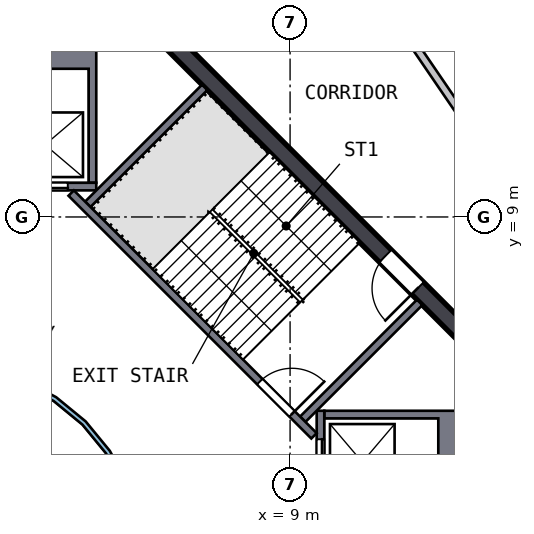
"""IFC4 building model, lengths in metres.
Left out: names, types, materials, properties, quantities, classifications, styles, units other than length and angle.
Written with IfcOpenShell. Run it as: python <this file> out.ifc"""

import sys

from ifc_helpers import new_model, si_unit, direction, frame, frame_2d, origin, place, context, subcontext, project, spatial, polyline, rectangle, outline, extrude, element, fill, save


model = new_model("IFC4")
c1 = context("Model", 3, precision=1e-05, world=origin(), true_north=direction((0.0, 1.0)))
c2 = subcontext(c1, "Body", "Model", "MODEL_VIEW")
j1 = project(units=[si_unit("LENGTHUNIT", "METRE"), si_unit("PLANEANGLEUNIT", "RADIAN")], contexts=[c1])
p1 = place(None, origin())
s1 = spatial("IfcSite", under=j1, at=p1, CompositionType="ELEMENT")
p2 = place(p1, origin())
s2 = spatial("IfcBuilding", under=s1, at=p2, CompositionType="ELEMENT")
p3 = place(p2, frame((0.0, 0.0, 295.0)))
s3 = spatial("IfcBuildingStorey", under=s2, at=p3, CompositionType="ELEMENT", Elevation=295.0)
p4 = place(p3, frame((13.841, 5.64, 0.0), z_axis=(0.0, 0.0, 1.0), x_axis=(-0.707106781, 0.707106781, 0.0)))
e1 = element("IfcWall", 1, at=p4, inside=s3, PredefinedType="SHEAR", context=c2, shape_type="SweptSolid", body=[
    extrude(rectangle(XDim=11.598, YDim=0.45, at=frame_2d((5.799, 0.0))), origin(), (0.0, 0.0, 1.0), 4.5),
])
p5 = place(p4, frame((2.099, 0.0, 0.0)))
e2 = element("IfcOpeningElement", 2, at=p5, cuts=e1, PredefinedType="OPENING", context=c2, shape_type="SweptSolid", body=[
    extrude(rectangle(XDim=1.2, YDim=2.1, at=frame_2d((0.6, 1.05))), frame((0.0, 0.235, 0.0), z_axis=(0.0, -1.0, 0.0), x_axis=(1.0, 0.0, 0.0)), (0.0, 0.0, 1.0), 0.47),
])
p6 = place(p3, origin())
e3 = element("IfcWall", 3, at=p6, inside=s3, PredefinedType="SOLIDWALL", context=c2, shape_type="SweptSolid", body=[
    extrude(outline(polyline([(13.55, 3.9), (13.55, 1.2), (9.9, 1.2), (9.9, 1.4), (12.9, 1.4), (12.9, 3.7), (9.9, 3.7), (9.9, 3.9), (13.55, 3.9)])), origin(), (0.0, 0.0, 1.0), 4.19),
])
p7 = place(p3, frame((9.8, 1.2, 0.0), z_axis=(0.0, 0.0, 1.0), x_axis=(0.0, 1.0, 0.0)))
e4 = element("IfcWall", 4, at=p7, inside=s3, PredefinedType="SOLIDWALL", context=c2, shape_type="SweptSolid", body=[
    extrude(rectangle(XDim=2.7, YDim=0.2, at=frame_2d((1.35, 0.0))), origin(), (0.0, 0.0, 1.0), 4.19),
])
p8 = place(p7, frame((0.75, 0.0, 0.0)))
e5 = element("IfcOpeningElement", 5, at=p8, cuts=e4, PredefinedType="OPENING", context=c2, shape_type="SweptSolid", body=[
    extrude(rectangle(XDim=1.2, YDim=2.1, at=frame_2d((0.6, 1.05))), frame((0.0, 0.11, 0.0), z_axis=(0.0, -1.0, 0.0), x_axis=(1.0, 0.0, 0.0)), (0.0, 0.0, 1.0), 0.22),
])
p9 = place(p3, origin())
e6 = element("IfcWall", 6, at=p9, inside=s3, PredefinedType="SOLIDWALL", context=c2, shape_type="SweptSolid", body=[
    extrude(outline(polyline([(3.9, 9.9), (3.7, 9.9), (3.7, 12.9), (1.4, 12.9), (1.4, 9.9), (1.2, 9.9), (1.2, 13.55), (3.9, 13.55), (3.9, 9.9)])), origin(), (0.0, 0.0, 1.0), 4.19),
])
p10 = place(p3, frame((1.2, 9.8, 0.0), z_axis=(0.0, 0.0, 1.0), x_axis=(1.0, 0.0, 0.0)))
e7 = element("IfcWall", 7, at=p10, inside=s3, PredefinedType="SOLIDWALL", context=c2, shape_type="SweptSolid", body=[
    extrude(rectangle(XDim=2.7, YDim=0.2, at=frame_2d((1.35, 0.0))), origin(), (0.0, 0.0, 1.0), 4.19),
])
p11 = place(p10, frame((0.75, 0.0, 0.0)))
e8 = element("IfcOpeningElement", 8, at=p11, cuts=e7, PredefinedType="OPENING", context=c2, shape_type="SweptSolid", body=[
    extrude(rectangle(XDim=1.2, YDim=2.1, at=frame_2d((0.6, 1.05))), frame((0.0, 0.11, 0.0), z_axis=(0.0, -1.0, 0.0), x_axis=(1.0, 0.0, 0.0)), (0.0, 0.0, 1.0), 0.22),
])
p12 = place(p3, frame((3.24, 9.629, 0.0), z_axis=(0.0, 0.0, 1.0), x_axis=(0.707106781, -0.707106781, 0.0)))
e9 = element("IfcWall", 9, at=p12, inside=s3, PredefinedType="SOLIDWALL", context=c2, shape_type="SweptSolid", body=[
    extrude(rectangle(XDim=9.036, YDim=0.2, at=frame_2d((4.518, 0.0))), origin(), (0.0, 0.0, 1.0), 4.19),
])
p13 = place(p12, frame((7.018, 0.0, 0.0)))
e10 = element("IfcOpeningElement", 10, at=p13, cuts=e9, PredefinedType="OPENING", context=c2, shape_type="SweptSolid", body=[
    extrude(rectangle(XDim=1.2, YDim=2.1, at=frame_2d((0.6, 1.05))), frame((0.0, 0.11, 0.0), z_axis=(0.0, -1.0, 0.0), x_axis=(1.0, 0.0, 0.0)), (0.0, 0.0, 1.0), 0.22),
])
for number, where, z_axis, x_axis in (
    (11, (9.334, 3.677, 0.0), (0.0, 0.0, 1.0), (0.707, 0.707, 0.0)),
    (12, (3.677, 9.334, 0.0), (0.0, 0.0, 1.0), (0.707, 0.707, 0.0)),
):
    element("IfcWall", number, at=place(p3, frame(where, z_axis=z_axis, x_axis=x_axis)), inside=s3, PredefinedType="SOLIDWALL", context=c2, shape_type="SweptSolid", body=[
        extrude(rectangle(XDim=4.35, YDim=0.2, at=frame_2d((2.175, 0.0))), origin(), (0.0, 0.0, 1.0), 4.19),
    ])
p14 = place(p3, origin())
e13 = element("IfcWall", 13, at=p14, inside=s3, PredefinedType="SOLIDWALL", context=c2, shape_type="SweptSolid", body=[
    extrude(outline(polyline([(5.021, -0.999), (4.73, -1.959), (4.257, -2.844), (3.62, -3.62), (2.844, -4.257), (1.959, -4.73), (0.999, -5.021), (0.0, -5.12), (-0.999, -5.021), (-1.959, -4.73), (-2.844, -4.257), (-3.62, -3.62), (-4.257, -2.844), (-4.73, -1.959), (-5.021, -0.999), (-5.12, 0.0), (-5.021, 0.999), (-4.73, 1.959), (-4.257, 2.844), (-3.62, 3.62), (-2.844, 4.257), (-1.959, 4.73), (-0.999, 5.021), (0.0, 5.12), (0.999, 5.021), (1.959, 4.73), (2.844, 4.257), (3.62, 3.62), (4.257, 2.844), (4.73, 1.959), (5.021, 0.999), (5.12, 0.0), (5.021, -0.999)]), holes=[polyline([(4.904, 0.976), (4.619, 1.913), (4.157, 2.778), (3.535, 3.535), (2.778, 4.157), (1.913, 4.619), (0.976, 4.904), (0.0, 5.0), (-0.976, 4.904), (-1.913, 4.619), (-2.778, 4.157), (-3.535, 3.535), (-4.157, 2.778), (-4.619, 1.913), (-4.904, 0.976), (-5.0, 0.0), (-4.904, -0.976), (-4.619, -1.913), (-4.157, -2.778), (-3.535, -3.535), (-2.778, -4.157), (-1.913, -4.619), (-0.976, -4.904), (0.0, -5.0), (0.976, -4.904), (1.913, -4.619), (2.778, -4.157), (3.535, -3.535), (4.157, -2.778), (4.619, -1.913), (4.904, -0.976), (5.0, 0.0), (4.904, 0.976)])]), origin(), (0.0, 0.0, 1.0), 4.19),
])
p15 = place(p3, frame((12.097, 13.777, 0.0), z_axis=(0.0, 0.0, 1.0), x_axis=(0.563825338, -0.825894054, 0.0)))
e14 = element("IfcWall", 14, at=p15, inside=s3, PredefinedType="SOLIDWALL", context=c2, shape_type="SweptSolid", body=[
    extrude(rectangle(XDim=9.116, YDim=0.2, at=frame_2d((4.558, 0.0))), origin(), (0.0, 0.0, 1.0), 4.19),
])
p16 = place(p15, frame((3.657, 0.0, 0.0)))
e15 = element("IfcOpeningElement", 15, at=p16, cuts=e14, PredefinedType="OPENING", context=c2, shape_type="SweptSolid", body=[
    extrude(rectangle(XDim=1.8, YDim=2.1, at=frame_2d((0.9, 1.05))), frame((0.0, 0.11, 0.0), z_axis=(0.0, -1.0, 0.0), x_axis=(1.0, 0.0, 0.0)), (0.0, 0.0, 1.0), 0.22),
])
p17 = place(p8, origin())
e16 = element("IfcDoor", 16, at=p17, inside=s3, OperationType="DOUBLE_DOOR_SLIDING", PredefinedType="DOOR", context=c2, shape_type="SweptSolid", body=[
    extrude(rectangle(XDim=1.2, YDim=2.1, at=frame_2d((0.6, 1.05))), frame((0.0, 0.025, 0.0), z_axis=(0.0, -1.0, 0.0), x_axis=(1.0, 0.0, 0.0)), (0.0, 0.0, 1.0), 0.05),
])
fill(e5, e16)
p18 = place(p11, origin())
e17 = element("IfcDoor", 17, at=p18, inside=s3, OperationType="DOUBLE_DOOR_SLIDING", PredefinedType="DOOR", context=c2, shape_type="SweptSolid", body=[
    extrude(rectangle(XDim=1.2, YDim=2.1, at=frame_2d((0.6, 1.05))), frame((0.0, 0.025, 0.0), z_axis=(0.0, -1.0, 0.0), x_axis=(1.0, 0.0, 0.0)), (0.0, 0.0, 1.0), 0.05),
])
fill(e8, e17)
p19 = place(p13, origin())
e18 = element("IfcDoor", 18, at=p19, inside=s3, OperationType="SINGLE_SWING_RIGHT", PredefinedType="DOOR", context=c2, shape_type="SweptSolid", body=[
    extrude(rectangle(XDim=1.2, YDim=2.1, at=frame_2d((0.6, 1.05))), frame((0.0, 0.025, 0.0), z_axis=(0.0, -1.0, 0.0), x_axis=(1.0, 0.0, 0.0)), (0.0, 0.0, 1.0), 0.05),
])
fill(e10, e18)
p20 = place(p5, origin())
e19 = element("IfcDoor", 19, at=p20, inside=s3, OperationType="SINGLE_SWING_LEFT", PredefinedType="DOOR", context=c2, shape_type="SweptSolid", body=[
    extrude(rectangle(XDim=1.2, YDim=2.1, at=frame_2d((0.6, 1.05))), frame((0.0, 0.025, 0.0), z_axis=(0.0, -1.0, 0.0), x_axis=(1.0, 0.0, 0.0)), (0.0, 0.0, 1.0), 0.05),
])
fill(e2, e19)
save(model, sys.argv[1])
